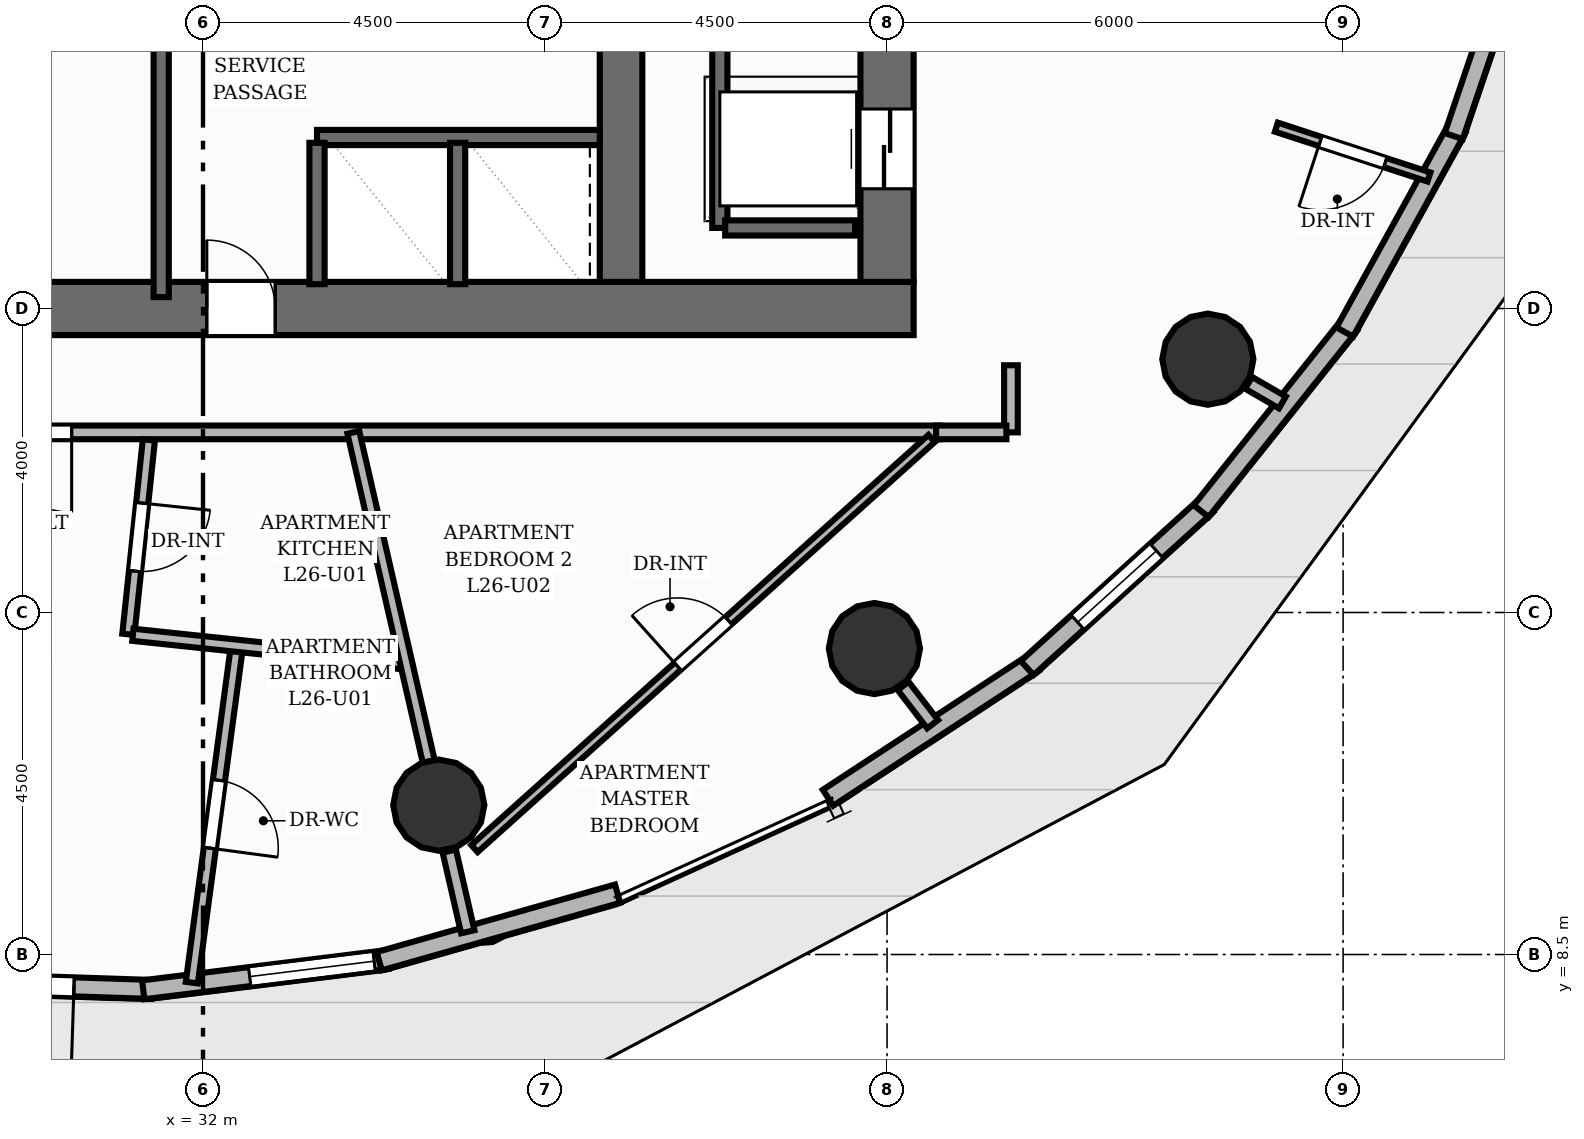
"""IFC4 building model, lengths in metres.
Left out: names, types, materials, properties, quantities, classifications, styles, units other than length and angle.
Written with IfcOpenShell. Run it as: python <this file> out.ifc"""

import sys

from ifc_helpers import new_model, si_unit, direction, frame, frame_2d, origin, origin_2d, place, context, subcontext, project, spatial, rectangle, circle, extrude, element, fill, save


model = new_model("IFC4")
c1 = context("Model", 3, precision=1e-05, world=origin(), true_north=direction((0.0, 1.0)))
c2 = subcontext(c1, "Body", "Model", "MODEL_VIEW")
j1 = project(units=[si_unit("LENGTHUNIT", "METRE"), si_unit("PLANEANGLEUNIT", "RADIAN")], contexts=[c1])
p1 = place(None, origin())
s1 = spatial("IfcSite", under=j1, at=p1, CompositionType="ELEMENT")
p2 = place(p1, origin())
s2 = spatial("IfcBuilding", under=s1, at=p2, CompositionType="ELEMENT")
p3 = place(p2, frame((0.0, 0.0, 90.08)))
s3 = spatial("IfcBuildingStorey", under=s2, at=p3, CompositionType="ELEMENT", Elevation=90.08)
p4 = place(p3, frame((22.65, 17.0, 0.0), z_axis=(0.0, 0.0, 1.0), x_axis=(1.0, 0.0, 0.0)))
e1 = element("IfcWall", 1, at=p4, inside=s3, PredefinedType="SHEAR", context=c2, shape_type="SweptSolid", body=[
    extrude(rectangle(XDim=18.7, YDim=0.7, at=frame_2d((9.35, 0.0))), origin(), (0.0, 0.0, 1.0), 3.2),
])
p5 = place(p4, frame((5.85, 0.0, 0.0)))
e2 = element("IfcOpeningElement", 2, at=p5, cuts=e1, PredefinedType="OPENING", context=c2, shape_type="SweptSolid", body=[
    extrude(rectangle(XDim=1.1, YDim=2.15, at=frame_2d((0.55, 1.075))), frame((0.0, 0.36, 0.0), z_axis=(0.0, -1.0, 0.0), x_axis=(1.0, 0.0, 0.0)), (0.0, 0.0, 1.0), 0.72),
])
p6 = place(p4, frame((9.4, 0.0, 0.0)))
e3 = element("IfcOpeningElement", 3, at=p6, cuts=e1, PredefinedType="OPENING", context=c2, shape_type="SweptSolid", body=[
    extrude(rectangle(XDim=0.9, YDim=2.1, at=frame_2d((0.45, 1.05))), frame((0.0, 0.36, 0.0), z_axis=(0.0, -1.0, 0.0), x_axis=(1.0, 0.0, 0.0)), (0.0, 0.0, 1.0), 0.72),
])
p7 = place(p3, frame((41.0, 17.35, 0.0), z_axis=(0.0, 0.0, 1.0), x_axis=(0.0, 1.0, 0.0)))
e4 = element("IfcWall", 4, at=p7, inside=s3, PredefinedType="SHEAR", context=c2, shape_type="SweptSolid", body=[
    extrude(rectangle(XDim=13.3, YDim=0.7, at=frame_2d((6.65, 0.0))), origin(), (0.0, 0.0, 1.0), 3.2),
])
p8 = place(p7, frame((1.225, 0.0, 0.0)))
e5 = element("IfcOpeningElement", 5, at=p8, cuts=e4, PredefinedType="OPENING", context=c2, shape_type="SweptSolid", body=[
    extrude(rectangle(XDim=1.05, YDim=2.15, at=frame_2d((0.525, 1.075))), frame((0.0, 0.36, 0.0), z_axis=(0.0, -1.0, 0.0), x_axis=(1.0, 0.0, 0.0)), (0.0, 0.0, 1.0), 0.72),
])
p9 = place(p7, frame((4.475, 0.0, 0.0)))
e6 = element("IfcOpeningElement", 6, at=p9, cuts=e4, PredefinedType="OPENING", context=c2, shape_type="SweptSolid", body=[
    extrude(rectangle(XDim=1.05, YDim=2.15, at=frame_2d((0.525, 1.075))), frame((0.0, 0.36, 0.0), z_axis=(0.0, -1.0, 0.0), x_axis=(1.0, 0.0, 0.0)), (0.0, 0.0, 1.0), 0.72),
])
p10 = place(p7, frame((7.775, 0.0, 0.0)))
e7 = element("IfcOpeningElement", 7, at=p10, cuts=e4, PredefinedType="OPENING", context=c2, shape_type="SweptSolid", body=[
    extrude(rectangle(XDim=1.05, YDim=2.15, at=frame_2d((0.525, 1.075))), frame((0.0, 0.36, 0.0), z_axis=(0.0, -1.0, 0.0), x_axis=(1.0, 0.0, 0.0)), (0.0, 0.0, 1.0), 0.72),
])
p11 = place(p7, frame((11.025, 0.0, 0.0)))
e8 = element("IfcOpeningElement", 8, at=p11, cuts=e4, PredefinedType="OPENING", context=c2, shape_type="SweptSolid", body=[
    extrude(rectangle(XDim=1.05, YDim=2.15, at=frame_2d((0.525, 1.075))), frame((0.0, 0.36, 0.0), z_axis=(0.0, -1.0, 0.0), x_axis=(1.0, 0.0, 0.0)), (0.0, 0.0, 1.0), 0.72),
])
p12 = place(p3, frame((37.5, 17.35, 0.0), z_axis=(0.0, 0.0, 1.0), x_axis=(0.0, 1.0, 0.0)))
e9 = element("IfcWall", 9, at=p12, inside=s3, PredefinedType="SHEAR", context=c2, shape_type="SweptSolid", body=[
    extrude(rectangle(XDim=13.3, YDim=0.56, at=frame_2d((6.65, 0.0))), origin(), (0.0, 0.0, 1.0), 3.2),
])
for number, where, z_axis, x_axis in (
    (10, (35.102, 10.465, 0.0), (0.0, 0.0, 1.0), (1.0, 0.0, 0.0)),
    (11, (40.833, 12.526, 0.0), (0.0, 0.0, 1.0), (1.0, 0.0, 0.0)),
    (12, (45.22, 16.333, 0.0), (0.0, 0.0, 1.0), (1.0, 0.0, 0.0)),
):
    element("IfcColumn", number, at=place(p3, frame(where, z_axis=z_axis, x_axis=x_axis)), inside=s3, PredefinedType="COLUMN", context=c2, shape_type="SweptSolid", body=[
        extrude(circle(Radius=0.6, at=origin_2d()), origin(), (0.0, 0.0, 1.0), 3.2),
    ])
p13 = place(p3, frame((31.323, 8.041, 0.0), z_axis=(0.0, 0.0, 1.0), x_axis=(-0.999464092211, 0.032734208101, 0.0)))
e13 = element("IfcWall", 13, at=p13, inside=s3, PredefinedType="SOLIDWALL", context=c2, shape_type="SweptSolid", body=[
    extrude(rectangle(XDim=3.192, YDim=0.25, at=frame_2d((1.596, 0.0))), origin(), (0.0, 0.0, 1.0), 2.96),
])
p14 = place(p13, frame((1.021, 0.0, 0.0)))
e14 = element("IfcOpeningElement", 14, at=p14, cuts=e13, PredefinedType="OPENING", context=c2, shape_type="SweptSolid", body=[
    extrude(rectangle(XDim=1.15, YDim=2.2, at=frame_2d((0.575, 1.1))), frame((0.0, 0.135, 0.0), z_axis=(0.0, -1.0, 0.0), x_axis=(1.0, 0.0, 0.0)), (0.0, 0.0, 1.0), 0.27),
])
p15 = place(p3, frame((34.425, 8.434, 0.0), z_axis=(0.0, 0.0, 1.0), x_axis=(-0.99241077266, -0.122966899235, 0.0)))
e15 = element("IfcWall", 15, at=p15, inside=s3, PredefinedType="SOLIDWALL", context=c2, shape_type="SweptSolid", body=[
    extrude(rectangle(XDim=3.236, YDim=0.25, at=frame_2d((1.618, 0.0))), origin(), (0.0, 0.0, 1.0), 2.96),
])
p16 = place(p15, frame((0.175, 0.0, 0.85)))
e16 = element("IfcOpeningElement", 16, at=p16, cuts=e15, PredefinedType="OPENING", context=c2, shape_type="SweptSolid", body=[
    extrude(rectangle(XDim=1.65, YDim=1.55, at=frame_2d((0.825, 0.775))), frame((0.0, 0.135, 0.0), z_axis=(0.0, -1.0, 0.0), x_axis=(1.0, 0.0, 0.0)), (0.0, 0.0, 1.0), 0.27),
])
p17 = place(p3, frame((37.455, 9.301, 0.0), z_axis=(0.0, 0.0, 1.0), x_axis=(-0.962134911526, -0.272573681825, 0.0)))
e17 = element("IfcWall", 17, at=p17, inside=s3, PredefinedType="SOLIDWALL", context=c2, shape_type="SweptSolid", body=[
    extrude(rectangle(XDim=3.26, YDim=0.25, at=frame_2d((1.63, 0.0))), origin(), (0.0, 0.0, 1.0), 2.96),
])
p18 = place(p3, frame((42.929, 12.337, 0.0), z_axis=(0.0, 0.0, 1.0), x_axis=(-0.836273856728, -0.548311988336, 0.0)))
e18 = element("IfcWall", 18, at=p18, inside=s3, PredefinedType="SOLIDWALL", context=c2, shape_type="SweptSolid", body=[
    extrude(rectangle(XDim=3.236, YDim=0.25, at=frame_2d((1.618, 0.0))), origin(), (0.0, 0.0, 1.0), 2.96),
])
p19 = place(p3, frame((45.208, 14.414, 0.0), z_axis=(0.0, 0.0, 1.0), x_axis=(-0.740832321657, -0.671690011232, 0.0)))
e19 = element("IfcWall", 19, at=p19, inside=s3, PredefinedType="SOLIDWALL", context=c2, shape_type="SweptSolid", body=[
    extrude(rectangle(XDim=3.192, YDim=0.25, at=frame_2d((1.596, 0.0))), origin(), (0.0, 0.0, 1.0), 2.96),
])
p20 = place(p19, frame((0.896, 0.0, 0.85)))
e20 = element("IfcOpeningElement", 20, at=p20, cuts=e19, PredefinedType="OPENING", context=c2, shape_type="SweptSolid", body=[
    extrude(rectangle(XDim=1.4, YDim=1.55, at=frame_2d((0.7, 0.775))), frame((0.0, 0.135, 0.0), z_axis=(0.0, -1.0, 0.0), x_axis=(1.0, 0.0, 0.0)), (0.0, 0.0, 1.0), 0.27),
])
p21 = place(p3, frame((47.084, 16.783, 0.0), z_axis=(0.0, 0.0, 1.0), x_axis=(-0.623134406496, -0.782114768714, 0.0)))
e21 = element("IfcWall", 21, at=p21, inside=s3, PredefinedType="SOLIDWALL", context=c2, shape_type="SweptSolid", body=[
    extrude(rectangle(XDim=3.131, YDim=0.25, at=frame_2d((1.565, 0.0))), origin(), (0.0, 0.0, 1.0), 2.96),
])
p22 = place(p3, frame((48.5, 19.371, 0.0), z_axis=(0.0, 0.0, 1.0), x_axis=(-0.482904421948, -0.875673066426, 0.0)))
e22 = element("IfcWall", 22, at=p22, inside=s3, PredefinedType="SOLIDWALL", context=c2, shape_type="SweptSolid", body=[
    extrude(rectangle(XDim=3.061, YDim=0.25, at=frame_2d((1.53, 0.0))), origin(), (0.0, 0.0, 1.0), 2.96),
])
p23 = place(p3, frame((49.415, 22.099, 0.0), z_axis=(0.0, 0.0, 1.0), x_axis=(-0.321149814784, -0.947028403198, 0.0)))
e23 = element("IfcWall", 23, at=p23, inside=s3, PredefinedType="SOLIDWALL", context=c2, shape_type="SweptSolid", body=[
    extrude(rectangle(XDim=2.988, YDim=0.25, at=frame_2d((1.494, 0.0))), origin(), (0.0, 0.0, 1.0), 2.96),
])
p24 = place(p3, frame((31.45, 17.15, 0.0), z_axis=(0.0, 0.0, 1.0), x_axis=(0.0, 1.0, 0.0)))
e24 = element("IfcWall", 24, at=p24, inside=s3, PredefinedType="SHEAR", context=c2, shape_type="SweptSolid", body=[
    extrude(rectangle(XDim=3.5, YDim=0.2, at=frame_2d((1.75, 0.0))), origin(), (0.0, 0.0, 1.0), 3.2),
])
p25 = place(p3, frame((38.8, 18.06, 0.0), z_axis=(0.0, 0.0, 1.0), x_axis=(0.0, 1.0, 0.0)))
e25 = element("IfcWall", 25, at=p25, inside=s3, PredefinedType="SHEAR", context=c2, shape_type="SweptSolid", body=[
    extrude(rectangle(XDim=11.88, YDim=0.2, at=frame_2d((5.94, 0.0))), origin(), (0.0, 0.0, 1.0), 3.2),
])
p26 = place(p3, frame((38.87, 18.06, 0.0), z_axis=(0.0, 0.0, 1.0), x_axis=(1.0, 0.0, 0.0)))
e26 = element("IfcWall", 26, at=p26, inside=s3, PredefinedType="SHEAR", context=c2, shape_type="SweptSolid", body=[
    extrude(rectangle(XDim=1.71, YDim=0.2, at=frame_2d((0.855, 0.0))), origin(), (0.0, 0.0, 1.0), 3.2),
])
p27 = place(p3, frame((33.5, 19.25, 0.0), z_axis=(0.0, 0.0, 1.0), x_axis=(1.0, 0.0, 0.0)))
e27 = element("IfcWall", 27, at=p27, inside=s3, PredefinedType="SHEAR", context=c2, shape_type="SweptSolid", body=[
    extrude(rectangle(XDim=3.72, YDim=0.2, at=frame_2d((1.86, 0.0))), origin(), (0.0, 0.0, 1.0), 3.2),
])
for number, where, z_axis, x_axis in (
    (28, (33.5, 17.32, 0.0), (0.0, 0.0, 1.0), (0.0, 1.0, 0.0)),
    (29, (35.35, 17.32, 0.0), (0.0, 0.0, 1.0), (0.0, 1.0, 0.0)),
):
    element("IfcWall", number, at=place(p3, frame(where, z_axis=z_axis, x_axis=x_axis)), inside=s3, PredefinedType="SHEAR", context=c2, shape_type="SweptSolid", body=[
        extrude(rectangle(XDim=1.86, YDim=0.2, at=frame_2d((0.93, 0.0))), origin(), (0.0, 0.0, 1.0), 3.2),
    ])
p28 = place(p3, frame((35.24, 9.861, 0.0), z_axis=(0.0, 0.0, 1.0), x_axis=(0.223287406217, -0.974752652843, 0.0)))
e30 = element("IfcWall", 30, at=p28, inside=s3, PredefinedType="PARTITIONING", context=c2, shape_type="SweptSolid", body=[
    extrude(rectangle(XDim=1.089, YDim=0.18, at=frame_2d((0.544, 0.0))), origin(), (0.0, 0.0, 1.0), 2.26),
])
p29 = place(p3, frame((41.212, 12.034, 0.0), z_axis=(0.0, 0.0, 1.0), x_axis=(0.609970610867, -0.792424036661, 0.0)))
e31 = element("IfcWall", 31, at=p29, inside=s3, PredefinedType="PARTITIONING", context=c2, shape_type="SweptSolid", body=[
    extrude(rectangle(XDim=0.635, YDim=0.18, at=frame_2d((0.318, 0.0))), origin(), (0.0, 0.0, 1.0), 2.26),
])
p30 = place(p3, frame((45.757, 16.022, 0.0), z_axis=(0.0, 0.0, 1.0), x_axis=(0.864981735625, -0.501803344981, 0.0)))
e32 = element("IfcWall", 32, at=p30, inside=s3, PredefinedType="PARTITIONING", context=c2, shape_type="SweptSolid", body=[
    extrude(rectangle(XDim=0.514, YDim=0.18, at=frame_2d((0.257, 0.0))), origin(), (0.0, 0.0, 1.0), 2.26),
])
p31 = place(p3, frame((41.695, 15.37, 0.0), z_axis=(0.0, 0.0, 1.0), x_axis=(-1.0, 0.0, 0.0)))
e33 = element("IfcWall", 33, at=p31, inside=s3, PredefinedType="PARTITIONING", context=c2, shape_type="SweptSolid", body=[
    extrude(rectangle(XDim=20.325, YDim=0.18, at=frame_2d((10.163, 0.0))), origin(), (0.0, 0.0, 1.0), 2.955),
])
p32 = place(p31, frame((11.424, 0.0, 0.0)))
e34 = element("IfcOpeningElement", 34, at=p32, cuts=e33, PredefinedType="OPENING", context=c2, shape_type="SweptSolid", body=[
    extrude(rectangle(XDim=1.05, YDim=2.15, at=frame_2d((0.525, 1.075))), frame((0.0, 0.1, 0.0), z_axis=(0.0, -1.0, 0.0), x_axis=(1.0, 0.0, 0.0)), (0.0, 0.0, 1.0), 0.2),
])
p33 = place(p3, frame((42.63, 16.253, 0.0), z_axis=(0.0, 0.0, 1.0), x_axis=(0.0, -1.0, 0.0)))
e35 = element("IfcWall", 35, at=p33, inside=s3, PredefinedType="PARTITIONING", context=c2, shape_type="SweptSolid", body=[
    extrude(rectangle(XDim=0.883, YDim=0.18, at=frame_2d((0.441, 0.0))), origin(), (0.0, 0.0, 1.0), 2.955),
])
p34 = place(p3, frame((42.57, 15.37, 0.0), z_axis=(0.0, 0.0, 1.0), x_axis=(-1.0, 0.0, 0.0)))
e36 = element("IfcWall", 36, at=p34, inside=s3, PredefinedType="PARTITIONING", context=c2, shape_type="SweptSolid", body=[
    extrude(rectangle(XDim=0.925, YDim=0.18, at=frame_2d((0.462, 0.0))), origin(), (0.0, 0.0, 1.0), 2.955),
])
p35 = place(p3, frame((32.448, 12.562, 0.0), z_axis=(0.0, 0.0, 1.0), x_axis=(-0.132986130607, -0.991117898671, 0.0)))
e37 = element("IfcWall", 37, at=p35, inside=s3, PredefinedType="PLUMBINGWALL", context=c2, shape_type="SweptSolid", body=[
    extrude(rectangle(XDim=4.472, YDim=0.16, at=frame_2d((2.236, 0.0))), origin(), (0.0, 0.0, 1.0), 2.955),
])
p36 = place(p35, frame((1.786, 0.0, 0.0)))
e38 = element("IfcOpeningElement", 38, at=p36, cuts=e37, PredefinedType="OPENING", context=c2, shape_type="SweptSolid", body=[
    extrude(rectangle(XDim=0.9, YDim=2.1, at=frame_2d((0.45, 1.05))), frame((0.0, 0.09, 0.0), z_axis=(0.0, -1.0, 0.0), x_axis=(1.0, 0.0, 0.0)), (0.0, 0.0, 1.0), 0.18),
])
p37 = place(p3, frame((31.288, 15.271, 0.0), z_axis=(0.0, 0.0, 1.0), x_axis=(-0.105094954285, -0.994462191631, 0.0)))
e39 = element("IfcWall", 39, at=p37, inside=s3, PredefinedType="PLUMBINGWALL", context=c2, shape_type="SweptSolid", body=[
    extrude(rectangle(XDim=2.572, YDim=0.16, at=frame_2d((1.286, 0.0))), origin(), (0.0, 0.0, 1.0), 2.641),
])
p38 = place(p37, frame((0.836, 0.0, 0.0)))
e40 = element("IfcOpeningElement", 40, at=p38, cuts=e39, PredefinedType="OPENING", context=c2, shape_type="SweptSolid", body=[
    extrude(rectangle(XDim=0.9, YDim=2.1, at=frame_2d((0.45, 1.05))), frame((0.0, 0.09, 0.0), z_axis=(0.0, -1.0, 0.0), x_axis=(1.0, 0.0, 0.0)), (0.0, 0.0, 1.0), 0.18),
])
p39 = place(p3, frame((31.077, 12.707, 0.0), z_axis=(0.0, 0.0, 1.0), x_axis=(0.994472124215, -0.105000924563, 0.0)))
e41 = element("IfcWall", 41, at=p39, inside=s3, PredefinedType="PLUMBINGWALL", context=c2, shape_type="SweptSolid", body=[
    extrude(rectangle(XDim=3.618, YDim=0.16, at=frame_2d((1.809, 0.0))), origin(), (0.0, 0.0, 1.0), 2.955),
])
p40 = place(p3, frame((33.978, 15.37, 0.0), z_axis=(0.0, 0.0, 1.0), x_axis=(0.223321757884, -0.974744783241, 0.0)))
e42 = element("IfcWall", 42, at=p40, inside=s3, PredefinedType="PLUMBINGWALL", context=c2, shape_type="SweptSolid", body=[
    extrude(rectangle(XDim=4.442, YDim=0.16, at=frame_2d((2.221, 0.0))), origin(), (0.0, 0.0, 1.0), 2.26),
])
p41 = place(p3, frame((48.13, 18.73, 0.0), z_axis=(0.0, 0.0, 1.0), x_axis=(-0.950573429935, 0.310499845896, 0.0)))
e43 = element("IfcWall", 43, at=p41, inside=s3, PredefinedType="PARTITIONING", context=c2, shape_type="SweptSolid", body=[
    extrude(rectangle(XDim=2.112, YDim=0.125, at=frame_2d((1.056, 0.0))), origin(), (0.0, 0.0, 1.0), 2.955),
])
p42 = place(p41, frame((0.606, 0.0, 0.0)))
e44 = element("IfcOpeningElement", 44, at=p42, cuts=e43, PredefinedType="OPENING", context=c2, shape_type="SweptSolid", body=[
    extrude(rectangle(XDim=0.9, YDim=2.1, at=frame_2d((0.45, 1.05))), frame((0.0, 0.073, 0.0), z_axis=(0.0, -1.0, 0.0), x_axis=(1.0, 0.0, 0.0)), (0.0, 0.0, 1.0), 0.145),
])
p43 = place(p3, frame((35.571, 9.894, 0.0), z_axis=(0.0, 0.0, 1.0), x_axis=(0.744379363772, 0.667756963865, 0.0)))
e45 = element("IfcWall", 45, at=p43, inside=s3, PredefinedType="PARTITIONING", context=c2, shape_type="SweptSolid", body=[
    extrude(rectangle(XDim=8.08, YDim=0.125, at=frame_2d((4.04, 0.0))), origin(), (0.0, 0.0, 1.0), 2.403),
])
p44 = place(p43, frame((3.59, 0.0, 0.0)))
e46 = element("IfcOpeningElement", 46, at=p44, cuts=e45, PredefinedType="OPENING", context=c2, shape_type="SweptSolid", body=[
    extrude(rectangle(XDim=0.9, YDim=2.1, at=frame_2d((0.45, 1.05))), frame((0.0, 0.073, 0.0), z_axis=(0.0, -1.0, 0.0), x_axis=(1.0, 0.0, 0.0)), (0.0, 0.0, 1.0), 0.145),
])
p45 = place(p14, origin())
e47 = element("IfcDoor", 47, at=p45, inside=s3, OperationType="SINGLE_SWING_LEFT", PredefinedType="DOOR", context=c2, shape_type="SweptSolid", body=[
    extrude(rectangle(XDim=1.15, YDim=2.2, at=frame_2d((0.575, 1.1))), frame((0.0, 0.025, 0.0), z_axis=(0.0, -1.0, 0.0), x_axis=(1.0, 0.0, 0.0)), (0.0, 0.0, 1.0), 0.05),
])
fill(e14, e47)
p46 = place(p16, origin())
e48 = element("IfcWindow", 48, at=p46, inside=s3, PartitioningType="SINGLE_PANEL", PredefinedType="WINDOW", context=c2, shape_type="SweptSolid", body=[
    extrude(rectangle(XDim=1.65, YDim=1.55, at=frame_2d((0.825, 0.775))), frame((0.0, 0.03, 0.0), z_axis=(0.0, -1.0, 0.0), x_axis=(1.0, 0.0, 0.0)), (0.0, 0.0, 1.0), 0.06),
])
fill(e16, e48)
p47 = place(p20, origin())
e49 = element("IfcWindow", 49, at=p47, inside=s3, PartitioningType="SINGLE_PANEL", PredefinedType="WINDOW", context=c2, shape_type="SweptSolid", body=[
    extrude(rectangle(XDim=1.4, YDim=1.55, at=frame_2d((0.7, 0.775))), frame((0.0, 0.03, 0.0), z_axis=(0.0, -1.0, 0.0), x_axis=(1.0, 0.0, 0.0)), (0.0, 0.0, 1.0), 0.06),
])
fill(e20, e49)
p48 = place(p8, origin())
e50 = element("IfcDoor", 50, at=p48, inside=s3, OperationType="DOUBLE_DOOR_SLIDING", PredefinedType="DOOR", context=c2, shape_type="SweptSolid", body=[
    extrude(rectangle(XDim=1.05, YDim=2.15, at=frame_2d((0.525, 1.075))), frame((0.0, 0.025, 0.0), z_axis=(0.0, -1.0, 0.0), x_axis=(1.0, 0.0, 0.0)), (0.0, 0.0, 1.0), 0.05),
])
fill(e5, e50)
p49 = place(p6, origin())
e51 = element("IfcDoor", 51, at=p49, inside=s3, OperationType="SINGLE_SWING_LEFT", PredefinedType="DOOR", context=c2, shape_type="SweptSolid", body=[
    extrude(rectangle(XDim=0.9, YDim=2.1, at=frame_2d((0.45, 1.05))), frame((0.0, 0.025, 0.0), z_axis=(0.0, -1.0, 0.0), x_axis=(1.0, 0.0, 0.0)), (0.0, 0.0, 1.0), 0.05),
])
fill(e3, e51)
p50 = place(p32, origin())
e52 = element("IfcDoor", 52, at=p50, inside=s3, OperationType="SINGLE_SWING_LEFT", PredefinedType="DOOR", context=c2, shape_type="SweptSolid", body=[
    extrude(rectangle(XDim=1.05, YDim=2.15, at=frame_2d((0.525, 1.075))), frame((0.0, 0.025, 0.0), z_axis=(0.0, -1.0, 0.0), x_axis=(1.0, 0.0, 0.0)), (0.0, 0.0, 1.0), 0.05),
])
fill(e34, e52)
p51 = place(p36, origin())
e53 = element("IfcDoor", 53, at=p51, inside=s3, OperationType="SINGLE_SWING_RIGHT", PredefinedType="DOOR", context=c2, shape_type="SweptSolid", body=[
    extrude(rectangle(XDim=0.9, YDim=2.1, at=frame_2d((0.45, 1.05))), frame((0.0, 0.025, 0.0), z_axis=(0.0, -1.0, 0.0), x_axis=(1.0, 0.0, 0.0)), (0.0, 0.0, 1.0), 0.05),
])
fill(e38, e53)
p52 = place(p38, origin())
e54 = element("IfcDoor", 54, at=p52, inside=s3, OperationType="SINGLE_SWING_LEFT", PredefinedType="DOOR", context=c2, shape_type="SweptSolid", body=[
    extrude(rectangle(XDim=0.9, YDim=2.1, at=frame_2d((0.45, 1.05))), frame((0.0, 0.025, 0.0), z_axis=(0.0, -1.0, 0.0), x_axis=(1.0, 0.0, 0.0)), (0.0, 0.0, 1.0), 0.05),
])
fill(e40, e54)
p53 = place(p42, origin())
e55 = element("IfcDoor", 55, at=p53, inside=s3, OperationType="SINGLE_SWING_RIGHT", PredefinedType="DOOR", context=c2, shape_type="SweptSolid", body=[
    extrude(rectangle(XDim=0.9, YDim=2.1, at=frame_2d((0.45, 1.05))), frame((0.0, 0.025, 0.0), z_axis=(0.0, -1.0, 0.0), x_axis=(1.0, 0.0, 0.0)), (0.0, 0.0, 1.0), 0.05),
])
fill(e44, e55)
p54 = place(p44, origin())
e56 = element("IfcDoor", 56, at=p54, inside=s3, OperationType="SINGLE_SWING_LEFT", PredefinedType="DOOR", context=c2, shape_type="SweptSolid", body=[
    extrude(rectangle(XDim=0.9, YDim=2.1, at=frame_2d((0.45, 1.05))), frame((0.0, 0.025, 0.0), z_axis=(0.0, -1.0, 0.0), x_axis=(1.0, 0.0, 0.0)), (0.0, 0.0, 1.0), 0.05),
])
fill(e46, e56)
save(model, sys.argv[1])
